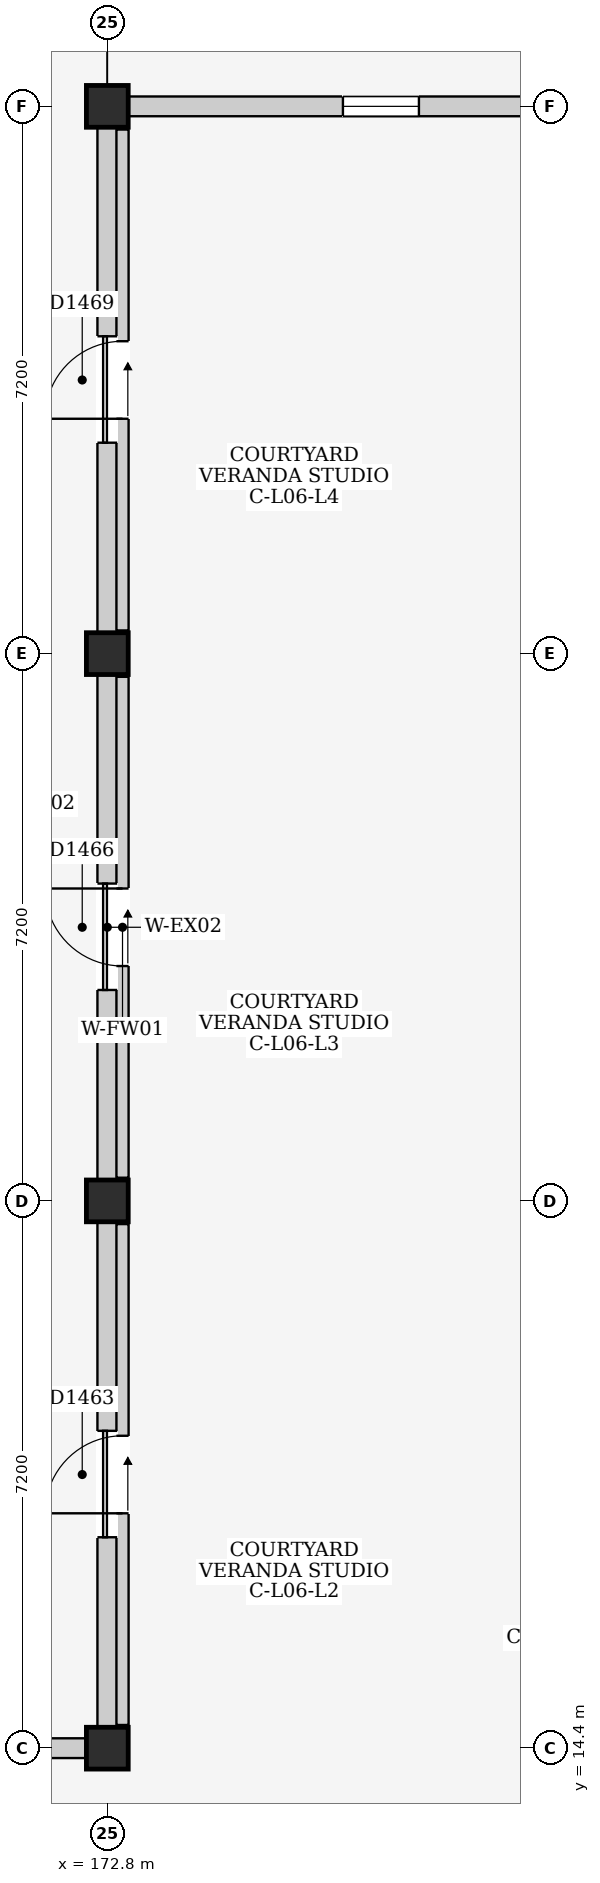
"""IFC4 building model, lengths in metres.
Left out: names, types, materials, properties, quantities, classifications, styles, units other than length and angle.
Written with IfcOpenShell. Run it as: python <this file> out.ifc"""

import sys

from ifc_helpers import new_model, si_unit, direction, frame, frame_2d, origin, origin_2d, place, context, subcontext, project, spatial, rectangle, extrude, element, fill, save


model = new_model("IFC4")
c1 = context("Model", 3, precision=1e-05, world=origin(), true_north=direction((0.0, 1.0)))
c2 = subcontext(c1, "Body", "Model", "MODEL_VIEW")
j1 = project(units=[si_unit("LENGTHUNIT", "METRE"), si_unit("PLANEANGLEUNIT", "RADIAN")], contexts=[c1])
p1 = place(None, origin())
s1 = spatial("IfcSite", under=j1, at=p1, CompositionType="ELEMENT")
p2 = place(p1, origin())
s2 = spatial("IfcBuilding", under=s1, at=p2, CompositionType="ELEMENT")
p3 = place(p2, frame((0.0, 0.0, 21.9)))
s3 = spatial("IfcBuildingStorey", under=s2, at=p3, CompositionType="ELEMENT", Elevation=21.9)
for number, where, z_axis, x_axis in (
    (1, (172.8, 14.4, 0.0), (0.0, 0.0, 1.0), (1.0, 0.0, 0.0)),
    (2, (172.8, 21.6, 0.0), (0.0, 0.0, 1.0), (1.0, 0.0, 0.0)),
    (3, (172.8, 28.8, 0.0), (0.0, 0.0, 1.0), (1.0, 0.0, 0.0)),
    (4, (172.8, 36.0, 0.0), (0.0, 0.0, 1.0), (1.0, 0.0, 0.0)),
):
    element("IfcColumn", number, at=place(p3, frame(where, z_axis=z_axis, x_axis=x_axis)), inside=s3, PredefinedType="COLUMN", context=c2, shape_type="SweptSolid", body=[
        extrude(rectangle(XDim=0.55, YDim=0.55, at=origin_2d()), origin(), (0.0, 0.0, 1.0), 3.2),
    ])
p4 = place(p3, frame((165.875, 14.4, 0.0), z_axis=(0.0, 0.0, 1.0), x_axis=(1.0, 0.0, 0.0)))
e5 = element("IfcWall", 5, at=p4, inside=s3, PredefinedType="ELEMENTEDWALL", context=c2, shape_type="SweptSolid", body=[
    extrude(rectangle(XDim=6.65, YDim=0.26, at=frame_2d((3.325, 0.0))), origin(), (0.0, 0.0, 1.0), 2.365),
])
p5 = place(p4, frame((2.825, 0.0, 1.2)))
e6 = element("IfcOpeningElement", 6, at=p5, cuts=e5, PredefinedType="OPENING", context=c2, shape_type="SweptSolid", body=[
    extrude(rectangle(XDim=1.0, YDim=0.9, at=frame_2d((0.5, 0.45))), frame((0.0, 0.145, 0.0), z_axis=(0.0, -1.0, 0.0), x_axis=(1.0, 0.0, 0.0)), (0.0, 0.0, 1.0), 0.29),
])
p6 = place(p3, frame((172.8, 14.675, 0.0), z_axis=(0.0, 0.0, 1.0), x_axis=(0.0, 1.0, 0.0)))
e7 = element("IfcWall", 7, at=p6, inside=s3, PredefinedType="ELEMENTEDWALL", context=c2, shape_type="SweptSolid", body=[
    extrude(rectangle(XDim=6.65, YDim=0.26, at=frame_2d((3.325, 0.0))), origin(), (0.0, 0.0, 1.0), 2.465),
])
p7 = place(p6, frame((2.5, 0.0, 0.0)))
e8 = element("IfcOpeningElement", 8, at=p7, cuts=e7, PredefinedType="OPENING", context=c2, shape_type="SweptSolid", body=[
    extrude(rectangle(XDim=1.4, YDim=2.1, at=frame_2d((0.7, 1.05))), frame((0.0, 0.145, 0.0), z_axis=(0.0, -1.0, 0.0), x_axis=(1.0, 0.0, 0.0)), (0.0, 0.0, 1.0), 0.29),
])
p8 = place(p3, frame((172.8, 21.875, 0.0), z_axis=(0.0, 0.0, 1.0), x_axis=(0.0, 1.0, 0.0)))
e9 = element("IfcWall", 9, at=p8, inside=s3, PredefinedType="ELEMENTEDWALL", context=c2, shape_type="SweptSolid", body=[
    extrude(rectangle(XDim=6.65, YDim=0.26, at=frame_2d((3.325, 0.0))), origin(), (0.0, 0.0, 1.0), 2.465),
])
p9 = place(p8, frame((2.5, 0.0, 0.0)))
e10 = element("IfcOpeningElement", 10, at=p9, cuts=e9, PredefinedType="OPENING", context=c2, shape_type="SweptSolid", body=[
    extrude(rectangle(XDim=1.4, YDim=2.1, at=frame_2d((0.7, 1.05))), frame((0.0, 0.145, 0.0), z_axis=(0.0, -1.0, 0.0), x_axis=(1.0, 0.0, 0.0)), (0.0, 0.0, 1.0), 0.29),
])
p10 = place(p3, frame((173.075, 36.0, 0.0), z_axis=(0.0, 0.0, 1.0), x_axis=(1.0, 0.0, 0.0)))
e11 = element("IfcWall", 11, at=p10, inside=s3, PredefinedType="ELEMENTEDWALL", context=c2, shape_type="SweptSolid", body=[
    extrude(rectangle(XDim=6.65, YDim=0.26, at=frame_2d((3.325, 0.0))), origin(), (0.0, 0.0, 1.0), 2.365),
])
p11 = place(p10, frame((2.825, 0.0, 1.1)))
e12 = element("IfcOpeningElement", 12, at=p11, cuts=e11, PredefinedType="OPENING", context=c2, shape_type="SweptSolid", body=[
    extrude(rectangle(XDim=1.0, YDim=0.9, at=frame_2d((0.5, 0.45))), frame((0.0, 0.145, 0.0), z_axis=(0.0, -1.0, 0.0), x_axis=(1.0, 0.0, 0.0)), (0.0, 0.0, 1.0), 0.29),
])
p12 = place(p3, frame((172.8, 29.075, 0.0), z_axis=(0.0, 0.0, 1.0), x_axis=(0.0, 1.0, 0.0)))
e13 = element("IfcWall", 13, at=p12, inside=s3, PredefinedType="ELEMENTEDWALL", context=c2, shape_type="SweptSolid", body=[
    extrude(rectangle(XDim=6.65, YDim=0.26, at=frame_2d((3.325, 0.0))), origin(), (0.0, 0.0, 1.0), 2.465),
])
p13 = place(p12, frame((2.5, 0.0, 0.0)))
e14 = element("IfcOpeningElement", 14, at=p13, cuts=e13, PredefinedType="OPENING", context=c2, shape_type="SweptSolid", body=[
    extrude(rectangle(XDim=1.4, YDim=2.1, at=frame_2d((0.7, 1.05))), frame((0.0, 0.145, 0.0), z_axis=(0.0, -1.0, 0.0), x_axis=(1.0, 0.0, 0.0)), (0.0, 0.0, 1.0), 0.29),
])
p14 = place(p3, frame((173.0, 14.705, 0.0), z_axis=(0.0, 0.0, 1.0), x_axis=(0.0, 1.0, 0.0)))
e15 = element("IfcWall", 15, at=p14, inside=s3, PredefinedType="PARTITIONING", context=c2, shape_type="SweptSolid", body=[
    extrude(rectangle(XDim=6.59, YDim=0.16, at=frame_2d((3.295, 0.0))), origin(), (0.0, 0.0, 1.0), 2.98),
])
p15 = place(p14, frame((2.785, 0.0, 0.0)))
e16 = element("IfcOpeningElement", 16, at=p15, cuts=e15, PredefinedType="OPENING", context=c2, shape_type="SweptSolid", body=[
    extrude(rectangle(XDim=1.02, YDim=2.18, at=frame_2d((0.51, 1.09))), frame((0.0, 0.095, 0.0), z_axis=(0.0, -1.0, 0.0), x_axis=(1.0, 0.0, 0.0)), (0.0, 0.0, 1.0), 0.19),
])
p16 = place(p3, frame((173.0, 21.905, 0.0), z_axis=(0.0, 0.0, 1.0), x_axis=(0.0, 1.0, 0.0)))
e17 = element("IfcWall", 17, at=p16, inside=s3, PredefinedType="PARTITIONING", context=c2, shape_type="SweptSolid", body=[
    extrude(rectangle(XDim=6.59, YDim=0.16, at=frame_2d((3.295, 0.0))), origin(), (0.0, 0.0, 1.0), 2.98),
])
p17 = place(p16, frame((2.785, 0.0, 0.0)))
e18 = element("IfcOpeningElement", 18, at=p17, cuts=e17, PredefinedType="OPENING", context=c2, shape_type="SweptSolid", body=[
    extrude(rectangle(XDim=1.02, YDim=2.18, at=frame_2d((0.51, 1.09))), frame((0.0, 0.095, 0.0), z_axis=(0.0, -1.0, 0.0), x_axis=(1.0, 0.0, 0.0)), (0.0, 0.0, 1.0), 0.19),
])
p18 = place(p3, frame((173.0, 29.105, 0.0), z_axis=(0.0, 0.0, 1.0), x_axis=(0.0, 1.0, 0.0)))
e19 = element("IfcWall", 19, at=p18, inside=s3, PredefinedType="PARTITIONING", context=c2, shape_type="SweptSolid", body=[
    extrude(rectangle(XDim=6.59, YDim=0.16, at=frame_2d((3.295, 0.0))), origin(), (0.0, 0.0, 1.0), 2.98),
])
p19 = place(p18, frame((2.785, 0.0, 0.0)))
e20 = element("IfcOpeningElement", 20, at=p19, cuts=e19, PredefinedType="OPENING", context=c2, shape_type="SweptSolid", body=[
    extrude(rectangle(XDim=1.02, YDim=2.18, at=frame_2d((0.51, 1.09))), frame((0.0, 0.095, 0.0), z_axis=(0.0, -1.0, 0.0), x_axis=(1.0, 0.0, 0.0)), (0.0, 0.0, 1.0), 0.19),
])
p20 = place(p7, frame((1.4, 0.0, 0.0), z_axis=(0.0, 0.0, 1.0), x_axis=(-1.0, 0.0, 0.0)))
e21 = element("IfcDoor", 21, at=p20, inside=s3, OperationType="SLIDING_TO_RIGHT", PredefinedType="DOOR", context=c2, shape_type="SweptSolid", body=[
    extrude(rectangle(XDim=1.4, YDim=2.1, at=frame_2d((0.7, 1.05))), frame((0.0, 0.025, 0.0), z_axis=(0.0, -1.0, 0.0), x_axis=(1.0, 0.0, 0.0)), (0.0, 0.0, 1.0), 0.05),
])
fill(e8, e21)
p21 = place(p9, frame((1.4, 0.0, 0.0), z_axis=(0.0, 0.0, 1.0), x_axis=(-1.0, 0.0, 0.0)))
e22 = element("IfcDoor", 22, at=p21, inside=s3, OperationType="SLIDING_TO_RIGHT", PredefinedType="DOOR", context=c2, shape_type="SweptSolid", body=[
    extrude(rectangle(XDim=1.4, YDim=2.1, at=frame_2d((0.7, 1.05))), frame((0.0, 0.025, 0.0), z_axis=(0.0, -1.0, 0.0), x_axis=(1.0, 0.0, 0.0)), (0.0, 0.0, 1.0), 0.05),
])
fill(e10, e22)
p22 = place(p11, origin())
e23 = element("IfcWindow", 23, at=p22, inside=s3, PartitioningType="SINGLE_PANEL", PredefinedType="WINDOW", context=c2, shape_type="SweptSolid", body=[
    extrude(rectangle(XDim=1.0, YDim=0.9, at=frame_2d((0.5, 0.45))), frame((0.0, 0.03, 0.0), z_axis=(0.0, -1.0, 0.0), x_axis=(1.0, 0.0, 0.0)), (0.0, 0.0, 1.0), 0.06),
])
fill(e12, e23)
p23 = place(p13, frame((1.4, 0.0, 0.0), z_axis=(0.0, 0.0, 1.0), x_axis=(-1.0, 0.0, 0.0)))
e24 = element("IfcDoor", 24, at=p23, inside=s3, OperationType="SLIDING_TO_RIGHT", PredefinedType="DOOR", context=c2, shape_type="SweptSolid", body=[
    extrude(rectangle(XDim=1.4, YDim=2.1, at=frame_2d((0.7, 1.05))), frame((0.0, 0.025, 0.0), z_axis=(0.0, -1.0, 0.0), x_axis=(1.0, 0.0, 0.0)), (0.0, 0.0, 1.0), 0.05),
])
fill(e14, e24)
p24 = place(p15, origin())
e25 = element("IfcDoor", 25, at=p24, inside=s3, OperationType="SINGLE_SWING_LEFT", PredefinedType="DOOR", context=c2, shape_type="SweptSolid", body=[
    extrude(rectangle(XDim=1.02, YDim=2.18, at=frame_2d((0.51, 1.09))), frame((0.0, 0.025, 0.0), z_axis=(0.0, -1.0, 0.0), x_axis=(1.0, 0.0, 0.0)), (0.0, 0.0, 1.0), 0.05),
])
fill(e16, e25)
p25 = place(p17, origin())
e26 = element("IfcDoor", 26, at=p25, inside=s3, OperationType="SINGLE_SWING_RIGHT", PredefinedType="DOOR", context=c2, shape_type="SweptSolid", body=[
    extrude(rectangle(XDim=1.02, YDim=2.18, at=frame_2d((0.51, 1.09))), frame((0.0, 0.025, 0.0), z_axis=(0.0, -1.0, 0.0), x_axis=(1.0, 0.0, 0.0)), (0.0, 0.0, 1.0), 0.05),
])
fill(e18, e26)
p26 = place(p19, origin())
e27 = element("IfcDoor", 27, at=p26, inside=s3, OperationType="SINGLE_SWING_LEFT", PredefinedType="DOOR", context=c2, shape_type="SweptSolid", body=[
    extrude(rectangle(XDim=1.02, YDim=2.18, at=frame_2d((0.51, 1.09))), frame((0.0, 0.025, 0.0), z_axis=(0.0, -1.0, 0.0), x_axis=(1.0, 0.0, 0.0)), (0.0, 0.0, 1.0), 0.05),
])
fill(e20, e27)
save(model, sys.argv[1])
